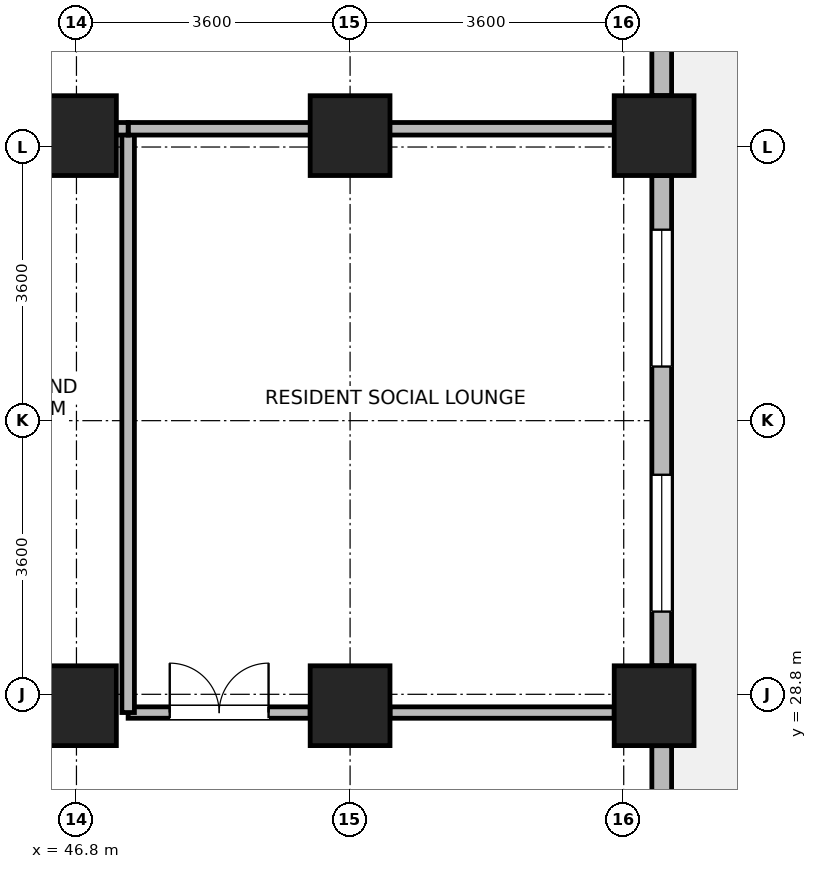
"""IFC4 building model, lengths in metres.
Left out: names, types, materials, properties, quantities, classifications, styles, units other than length and angle.
Written with IfcOpenShell. Run it as: python <this file> out.ifc"""

import sys

from ifc_helpers import new_model, si_unit, direction, frame, frame_2d, origin, origin_2d, place, context, subcontext, project, spatial, rectangle, extrude, source, transform, mapped, element, fill, save


model = new_model("IFC4")
c1 = context("Model", 3, precision=1e-05, world=origin(), true_north=direction((0.0, 1.0)))
c2 = subcontext(c1, "Body", "Model", "MODEL_VIEW")
j1 = project(units=[si_unit("LENGTHUNIT", "METRE"), si_unit("PLANEANGLEUNIT", "RADIAN")], contexts=[c1])
p1 = place(None, origin())
s1 = spatial("IfcSite", under=j1, at=p1, CompositionType="ELEMENT")
p2 = place(p1, origin())
s2 = spatial("IfcBuilding", under=s1, at=p2, CompositionType="ELEMENT")
p3 = place(p2, frame((0.0, 0.0, 162.4)))
s3 = spatial("IfcBuildingStorey", under=s2, at=p3, CompositionType="ELEMENT", Elevation=162.4)
m1 = source(origin(), c2, "Body", "SweptSolid", [
    extrude(rectangle(XDim=1.05, YDim=1.05, at=origin_2d()), origin(), (0.0, 0.0, 1.0), 3.7),
])
for number, where, z_axis, x_axis in (
    (1, (46.8, 28.65, 0.0), (0.0, 0.0, 1.0), (1.0, 0.0, 0.0)),
    (2, (46.8, 36.15, 0.0), (0.0, 0.0, 1.0), (1.0, 0.0, 0.0)),
    (3, (50.4, 28.65, 0.0), (0.0, 0.0, 1.0), (1.0, 0.0, 0.0)),
    (4, (50.4, 36.15, 0.0), (0.0, 0.0, 1.0), (1.0, 0.0, 0.0)),
    (5, (54.4, 28.65, 0.0), (0.0, 0.0, 1.0), (1.0, 0.0, 0.0)),
    (6, (54.4, 36.15, 0.0), (0.0, 0.0, 1.0), (1.0, 0.0, 0.0)),
):
    element("IfcColumn", number, at=place(p3, frame(where, z_axis=z_axis, x_axis=x_axis)), inside=s3, PredefinedType="COLUMN", context=c2, shape_type="MappedRepresentation", body=[
        mapped(m1, transform((0.0, 0.0, 0.0), x_axis=(1.0, 0.0, 0.0), y_axis=(0.0, 1.0, 0.0), z_axis=(0.0, 0.0, 1.0), scale=1.0)),
    ])
p4 = place(p3, frame((54.5, 28.124, 0.0), z_axis=(0.0, 0.0, 1.0), x_axis=(0.0, -1.0, 0.0)))
e7 = element("IfcWall", 7, at=p4, inside=s3, PredefinedType="STANDARD", context=c2, shape_type="SweptSolid", body=[
    extrude(rectangle(XDim=5.998, YDim=0.26, at=frame_2d((2.999, 0.0))), origin(), (0.0, 0.0, 1.0), 2.99),
])
p5 = place(p4, frame((3.598, 0.0, 0.85)))
e8 = element("IfcOpeningElement", 8, at=p5, cuts=e7, PredefinedType="OPENING", context=c2, shape_type="SweptSolid", body=[
    extrude(rectangle(XDim=1.8, YDim=1.85, at=frame_2d((0.9, 0.925))), frame((0.0, 0.14, 0.0), z_axis=(0.0, -1.0, 0.0), x_axis=(1.0, 0.0, 0.0)), (0.0, 0.0, 1.0), 0.28),
])
p6 = place(p4, frame((2.044, 0.0, 0.85)))
e9 = element("IfcOpeningElement", 9, at=p6, cuts=e7, PredefinedType="OPENING", context=c2, shape_type="SweptSolid", body=[
    extrude(rectangle(XDim=0.95, YDim=1.75, at=frame_2d((0.475, 0.875))), frame((0.0, 0.14, 0.0), z_axis=(0.0, -1.0, 0.0), x_axis=(1.0, 0.0, 0.0)), (0.0, 0.0, 1.0), 0.28),
])
p7 = place(p3, frame((54.5, 35.624, 0.0), z_axis=(0.0, 0.0, 1.0), x_axis=(0.0, -1.0, 0.0)))
e10 = element("IfcWall", 10, at=p7, inside=s3, PredefinedType="STANDARD", context=c2, shape_type="SweptSolid", body=[
    extrude(rectangle(XDim=6.448, YDim=0.26, at=frame_2d((3.224, 0.0))), origin(), (0.0, 0.0, 1.0), 2.99),
])
p8 = place(p7, frame((0.712, 0.0, 0.85)))
e11 = element("IfcOpeningElement", 11, at=p8, cuts=e10, PredefinedType="OPENING", context=c2, shape_type="SweptSolid", body=[
    extrude(rectangle(XDim=1.8, YDim=1.85, at=frame_2d((0.9, 0.925))), frame((0.0, 0.14, 0.0), z_axis=(0.0, -1.0, 0.0), x_axis=(1.0, 0.0, 0.0)), (0.0, 0.0, 1.0), 0.28),
])
p9 = place(p7, frame((3.936, 0.0, 0.85)))
e12 = element("IfcOpeningElement", 12, at=p9, cuts=e10, PredefinedType="OPENING", context=c2, shape_type="SweptSolid", body=[
    extrude(rectangle(XDim=1.8, YDim=1.85, at=frame_2d((0.9, 0.925))), frame((0.0, 0.14, 0.0), z_axis=(0.0, -1.0, 0.0), x_axis=(1.0, 0.0, 0.0)), (0.0, 0.0, 1.0), 0.28),
])
p10 = place(p3, frame((54.5, 43.33, 0.0), z_axis=(0.0, 0.0, 1.0), x_axis=(0.0, -1.0, 0.0)))
e13 = element("IfcWall", 13, at=p10, inside=s3, PredefinedType="STANDARD", context=c2, shape_type="SweptSolid", body=[
    extrude(rectangle(XDim=6.654, YDim=0.26, at=frame_2d((3.327, 0.0))), origin(), (0.0, 0.0, 1.0), 3.44),
])
p11 = place(p10, frame((0.763, 0.0, 0.85)))
e14 = element("IfcOpeningElement", 14, at=p11, cuts=e13, PredefinedType="OPENING", context=c2, shape_type="SweptSolid", body=[
    extrude(rectangle(XDim=1.8, YDim=1.85, at=frame_2d((0.9, 0.925))), frame((0.0, 0.14, 0.0), z_axis=(0.0, -1.0, 0.0), x_axis=(1.0, 0.0, 0.0)), (0.0, 0.0, 1.0), 0.28),
])
p12 = place(p10, frame((4.091, 0.0, 0.85)))
e15 = element("IfcOpeningElement", 15, at=p12, cuts=e13, PredefinedType="OPENING", context=c2, shape_type="SweptSolid", body=[
    extrude(rectangle(XDim=1.8, YDim=1.85, at=frame_2d((0.9, 0.925))), frame((0.0, 0.14, 0.0), z_axis=(0.0, -1.0, 0.0), x_axis=(1.0, 0.0, 0.0)), (0.0, 0.0, 1.0), 0.28),
])
p13 = place(p3, frame((47.48, 28.56, 0.0), z_axis=(0.0, 0.0, 1.0), x_axis=(1.0, 0.0, 0.0)))
e16 = element("IfcWall", 16, at=p13, inside=s3, PredefinedType="PARTITIONING", context=c2, shape_type="SweptSolid", body=[
    extrude(rectangle(XDim=2.395, YDim=0.15, at=frame_2d((1.198, 0.0))), origin(), (0.0, 0.0, 1.0), 2.84),
])
p14 = place(p13, frame((0.548, 0.0, 0.0)))
e17 = element("IfcOpeningElement", 17, at=p14, cuts=e16, PredefinedType="OPENING", context=c2, shape_type="SweptSolid", body=[
    extrude(rectangle(XDim=1.3, YDim=2.12, at=frame_2d((0.65, 1.06))), frame((0.0, 0.085, 0.0), z_axis=(0.0, -1.0, 0.0), x_axis=(1.0, 0.0, 0.0)), (0.0, 0.0, 1.0), 0.17),
])
p15 = place(p3, frame((50.925, 28.56, 0.0), z_axis=(0.0, 0.0, 1.0), x_axis=(1.0, 0.0, 0.0)))
e18 = element("IfcWall", 18, at=p15, inside=s3, PredefinedType="PARTITIONING", context=c2, shape_type="SweptSolid", body=[
    extrude(rectangle(XDim=2.95, YDim=0.15, at=frame_2d((1.475, 0.0))), origin(), (0.0, 0.0, 1.0), 2.84),
])
p16 = place(p3, frame((47.48, 28.56, 0.0), z_axis=(0.0, 0.0, 1.0), x_axis=(0.0, 1.0, 0.0)))
e19 = element("IfcWall", 19, at=p16, inside=s3, PredefinedType="PARTITIONING", context=c2, shape_type="SweptSolid", body=[
    extrude(rectangle(XDim=7.68, YDim=0.165, at=frame_2d((3.84, 0.0))), origin(), (0.0, 0.0, 1.0), 3.44),
])
p17 = place(p3, frame((47.48, 36.24, 0.0), z_axis=(0.0, 0.0, 1.0), x_axis=(1.0, 0.0, 0.0)))
e20 = element("IfcWall", 20, at=p17, inside=s3, PredefinedType="PARTITIONING", context=c2, shape_type="SweptSolid", body=[
    extrude(rectangle(XDim=6.888, YDim=0.165, at=frame_2d((3.444, 0.0))), origin(), (0.0, 0.0, 1.0), 2.84),
])
p18 = place(p3, frame((43.8, 36.24, 0.0), z_axis=(0.0, 0.0, 1.0), x_axis=(1.0, 0.0, 0.0)))
e21 = element("IfcWall", 21, at=p18, inside=s3, PredefinedType="PARTITIONING", context=c2, shape_type="SweptSolid", body=[
    extrude(rectangle(XDim=3.68, YDim=0.165, at=frame_2d((1.84, 0.0))), origin(), (0.0, 0.0, 1.0), 2.84),
])
p19 = place(p8, origin())
e22 = element("IfcWindow", 22, at=p19, inside=s3, PartitioningType="SINGLE_PANEL", PredefinedType="WINDOW", context=c2, shape_type="SweptSolid", body=[
    extrude(rectangle(XDim=1.8, YDim=1.85, at=frame_2d((0.9, 0.925))), frame((0.0, 0.03, 0.0), z_axis=(0.0, -1.0, 0.0), x_axis=(1.0, 0.0, 0.0)), (0.0, 0.0, 1.0), 0.06),
])
fill(e11, e22)
p20 = place(p9, origin())
e23 = element("IfcWindow", 23, at=p20, inside=s3, PartitioningType="SINGLE_PANEL", PredefinedType="WINDOW", context=c2, shape_type="SweptSolid", body=[
    extrude(rectangle(XDim=1.8, YDim=1.85, at=frame_2d((0.9, 0.925))), frame((0.0, 0.03, 0.0), z_axis=(0.0, -1.0, 0.0), x_axis=(1.0, 0.0, 0.0)), (0.0, 0.0, 1.0), 0.06),
])
fill(e12, e23)
p21 = place(p14, origin())
e24 = element("IfcDoor", 24, at=p21, inside=s3, OperationType="DOUBLE_DOOR_SINGLE_SWING", PredefinedType="DOOR", context=c2, shape_type="SweptSolid", body=[
    extrude(rectangle(XDim=1.3, YDim=2.12, at=frame_2d((0.65, 1.06))), frame((0.0, 0.025, 0.0), z_axis=(0.0, -1.0, 0.0), x_axis=(1.0, 0.0, 0.0)), (0.0, 0.0, 1.0), 0.05),
])
fill(e17, e24)
save(model, sys.argv[1])
